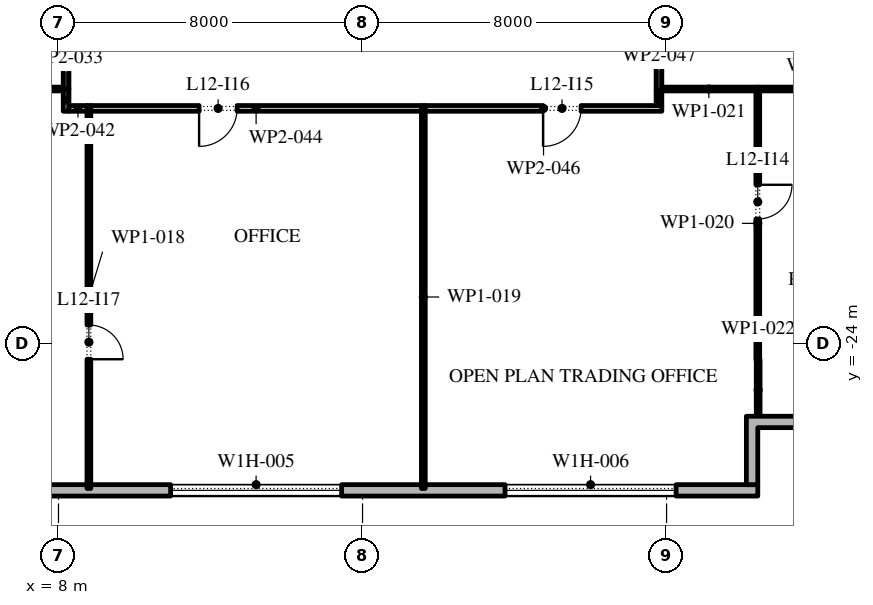
"""IFC4 building model, lengths in metres.
Left out: names, types, materials, properties, quantities, classifications, styles, units other than length and angle.
Written with IfcOpenShell. Run it as: python <this file> out.ifc"""

import sys

from ifc_helpers import new_model, si_unit, direction, frame, frame_2d, origin, place, context, subcontext, project, spatial, polyline, rectangle, outline, extrude, element, fill, save


model = new_model("IFC4")
c1 = context("Model", 3, precision=1e-05, world=origin(), true_north=direction((0.0, 1.0)))
c2 = subcontext(c1, "Body", "Model", "MODEL_VIEW")
j1 = project(units=[si_unit("LENGTHUNIT", "METRE"), si_unit("PLANEANGLEUNIT", "RADIAN")], contexts=[c1])
p1 = place(None, origin())
s1 = spatial("IfcSite", under=j1, at=p1, CompositionType="ELEMENT")
p2 = place(p1, origin())
s2 = spatial("IfcBuilding", under=s1, at=p2, CompositionType="ELEMENT")
p3 = place(p2, frame((0.0, 0.0, 60.6)))
s3 = spatial("IfcBuildingStorey", under=s2, at=p3, CompositionType="ELEMENT", Elevation=60.6)
p4 = place(p3, frame((-26.1, -27.85, 0.0), z_axis=(0.0, 0.0, 1.0), x_axis=(1.0, 0.0, 0.0)))
e1 = element("IfcWall", 1, at=p4, inside=s3, PredefinedType="STANDARD", context=c2, shape_type="SweptSolid", body=[
    extrude(rectangle(XDim=52.5, YDim=0.3, at=frame_2d((26.25, 0.0))), origin(), (0.0, 0.0, 1.0), 4.0),
])
p5 = place(p4, frame((2.0, 0.0, 0.45)))
e2 = element("IfcOpeningElement", 2, at=p5, cuts=e1, PredefinedType="OPENING", context=c2, shape_type="SweptSolid", body=[
    extrude(rectangle(XDim=4.5, YDim=2.75, at=frame_2d((2.25, 1.375))), frame((0.0, 0.16, 0.0), z_axis=(0.0, -1.0, 0.0), x_axis=(1.0, 0.0, 0.0)), (0.0, 0.0, 1.0), 0.32),
])
p6 = place(p4, frame((10.65, 0.0, 0.45)))
e3 = element("IfcOpeningElement", 3, at=p6, cuts=e1, PredefinedType="OPENING", context=c2, shape_type="SweptSolid", body=[
    extrude(rectangle(XDim=4.5, YDim=2.75, at=frame_2d((2.25, 1.375))), frame((0.0, 0.16, 0.0), z_axis=(0.0, -1.0, 0.0), x_axis=(1.0, 0.0, 0.0)), (0.0, 0.0, 1.0), 0.32),
])
p7 = place(p4, frame((20.5, 0.0, 0.0)))
e4 = element("IfcOpeningElement", 4, at=p7, cuts=e1, PredefinedType="OPENING", context=c2, shape_type="SweptSolid", body=[
    extrude(rectangle(XDim=2.4, YDim=3.5, at=frame_2d((1.2, 1.75))), frame((0.0, 0.16, 0.0), z_axis=(0.0, -1.0, 0.0), x_axis=(1.0, 0.0, 0.0)), (0.0, 0.0, 1.0), 0.32),
])
p8 = place(p4, frame((28.25, 0.0, 0.45)))
e5 = element("IfcOpeningElement", 5, at=p8, cuts=e1, PredefinedType="OPENING", context=c2, shape_type="SweptSolid", body=[
    extrude(rectangle(XDim=4.5, YDim=2.75, at=frame_2d((2.25, 1.375))), frame((0.0, 0.16, 0.0), z_axis=(0.0, -1.0, 0.0), x_axis=(1.0, 0.0, 0.0)), (0.0, 0.0, 1.0), 0.32),
])
p9 = place(p4, frame((37.05, 0.0, 0.45)))
e6 = element("IfcOpeningElement", 6, at=p9, cuts=e1, PredefinedType="OPENING", context=c2, shape_type="SweptSolid", body=[
    extrude(rectangle(XDim=4.5, YDim=2.75, at=frame_2d((2.25, 1.375))), frame((0.0, 0.16, 0.0), z_axis=(0.0, -1.0, 0.0), x_axis=(1.0, 0.0, 0.0)), (0.0, 0.0, 1.0), 0.32),
])
p10 = place(p4, frame((45.85, 0.0, 0.45)))
e7 = element("IfcOpeningElement", 7, at=p10, cuts=e1, PredefinedType="OPENING", context=c2, shape_type="SweptSolid", body=[
    extrude(rectangle(XDim=4.5, YDim=2.75, at=frame_2d((2.25, 1.375))), frame((0.0, 0.16, 0.0), z_axis=(0.0, -1.0, 0.0), x_axis=(1.0, 0.0, 0.0)), (0.0, 0.0, 1.0), 0.32),
])
p11 = place(p3, origin())
e8 = element("IfcWall", 8, at=p11, inside=s3, PredefinedType="STANDARD", context=c2, shape_type="SweptSolid", body=[
    extrude(outline(polyline([(27.9, -25.9), (27.9, -24.1), (30.0, -24.1), (30.0, -24.4), (28.2, -24.4), (28.2, -26.2), (26.4, -26.2), (26.4, -27.7), (26.1, -27.7), (26.1, -25.9), (27.9, -25.9)])), origin(), (0.0, 0.0, 1.0), 4.0),
])
p12 = place(p3, frame((8.2, -17.875, 0.0), z_axis=(0.0, 0.0, 1.0), x_axis=(0.0, 1.0, 0.0)))
e9 = element("IfcWall", 9, at=p12, inside=s3, PredefinedType="PARTITIONING", context=c2, shape_type="SweptSolid", body=[
    extrude(rectangle(XDim=0.585, YDim=0.15, at=frame_2d((0.292, 0.0))), origin(), (0.0, 0.0, 1.0), 4.0),
])
p13 = place(p3, frame((8.125, -17.29, 0.0), z_axis=(0.0, 0.0, 1.0), x_axis=(-1.0, 0.0, 0.0)))
e10 = element("IfcWall", 10, at=p13, inside=s3, PredefinedType="PARTITIONING", context=c2, shape_type="SweptSolid", body=[
    extrude(rectangle(XDim=8.075, YDim=0.1, at=frame_2d((4.038, 0.0))), origin(), (0.0, 0.0, 1.0), 4.0),
])
p14 = place(p3, frame((8.2, -17.29, 0.0), z_axis=(0.0, 0.0, 1.0), x_axis=(0.0, 1.0, 0.0)))
e11 = element("IfcWall", 11, at=p14, inside=s3, PredefinedType="PARTITIONING", context=c2, shape_type="SweptSolid", body=[
    extrude(rectangle(XDim=8.74, YDim=0.15, at=frame_2d((4.37, 0.0))), origin(), (0.0, 0.0, 1.0), 4.0),
])
p15 = place(p14, frame((3.89, 0.0, 0.0)))
e12 = element("IfcOpeningElement", 12, at=p15, cuts=e11, PredefinedType="OPENING", context=c2, shape_type="SweptSolid", body=[
    extrude(rectangle(XDim=1.0, YDim=2.1, at=frame_2d((0.5, 1.05))), frame((0.0, 0.085, 0.0), z_axis=(0.0, -1.0, 0.0), x_axis=(1.0, 0.0, 0.0)), (0.0, 0.0, 1.0), 0.17),
])
p16 = place(p3, frame((8.8, -27.8, 0.0), z_axis=(0.0, 0.0, 1.0), x_axis=(0.0, 1.0, 0.0)))
e13 = element("IfcWall", 13, at=p16, inside=s3, PredefinedType="PARTITIONING", context=c2, shape_type="SweptSolid", body=[
    extrude(rectangle(XDim=10.075, YDim=0.1, at=frame_2d((5.038, 0.0))), origin(), (0.0, 0.0, 1.0), 4.0),
])
p17 = place(p16, frame((3.4, 0.0, 0.0)))
e14 = element("IfcOpeningElement", 14, at=p17, cuts=e13, PredefinedType="OPENING", context=c2, shape_type="SweptSolid", body=[
    extrude(rectangle(XDim=0.9, YDim=2.1, at=frame_2d((0.45, 1.05))), frame((0.0, 0.06, 0.0), z_axis=(0.0, -1.0, 0.0), x_axis=(1.0, 0.0, 0.0)), (0.0, 0.0, 1.0), 0.12),
])
p18 = place(p3, frame((8.75, -17.8, 0.0), z_axis=(0.0, 0.0, 1.0), x_axis=(-1.0, 0.0, 0.0)))
e15 = element("IfcWall", 15, at=p18, inside=s3, PredefinedType="PARTITIONING", context=c2, shape_type="SweptSolid", body=[
    extrude(rectangle(XDim=0.475, YDim=0.15, at=frame_2d((0.238, 0.0))), origin(), (0.0, 0.0, 1.0), 4.0),
])
p19 = place(p3, frame((17.6, -27.8, 0.0), z_axis=(0.0, 0.0, 1.0), x_axis=(0.0, 1.0, 0.0)))
e16 = element("IfcWall", 16, at=p19, inside=s3, PredefinedType="PARTITIONING", context=c2, shape_type="SweptSolid", body=[
    extrude(rectangle(XDim=10.075, YDim=0.1, at=frame_2d((5.038, 0.0))), origin(), (0.0, 0.0, 1.0), 4.0),
])
p20 = place(p3, frame((17.55, -17.8, 0.0), z_axis=(0.0, 0.0, 1.0), x_axis=(-1.0, 0.0, 0.0)))
e17 = element("IfcWall", 17, at=p20, inside=s3, PredefinedType="PARTITIONING", context=c2, shape_type="SweptSolid", body=[
    extrude(rectangle(XDim=8.7, YDim=0.15, at=frame_2d((4.35, 0.0))), origin(), (0.0, 0.0, 1.0), 4.0),
])
p21 = place(p20, frame((4.85, 0.0, 0.0)))
e18 = element("IfcOpeningElement", 18, at=p21, cuts=e17, PredefinedType="OPENING", context=c2, shape_type="SweptSolid", body=[
    extrude(rectangle(XDim=1.0, YDim=2.1, at=frame_2d((0.5, 1.05))), frame((0.0, 0.085, 0.0), z_axis=(0.0, -1.0, 0.0), x_axis=(1.0, 0.0, 0.0)), (0.0, 0.0, 1.0), 0.17),
])
p22 = place(p3, frame((23.875, -17.8, 0.0), z_axis=(0.0, 0.0, 1.0), x_axis=(-1.0, 0.0, 0.0)))
e19 = element("IfcWall", 19, at=p22, inside=s3, PredefinedType="PARTITIONING", context=c2, shape_type="SweptSolid", body=[
    extrude(rectangle(XDim=6.225, YDim=0.15, at=frame_2d((3.113, 0.0))), origin(), (0.0, 0.0, 1.0), 4.0),
])
p23 = place(p22, frame((2.125, 0.0, 0.0)))
e20 = element("IfcOpeningElement", 20, at=p23, cuts=e19, PredefinedType="OPENING", context=c2, shape_type="SweptSolid", body=[
    extrude(rectangle(XDim=1.0, YDim=2.1, at=frame_2d((0.5, 1.05))), frame((0.0, 0.085, 0.0), z_axis=(0.0, -1.0, 0.0), x_axis=(1.0, 0.0, 0.0)), (0.0, 0.0, 1.0), 0.17),
])
p24 = place(p3, frame((23.8, -17.34, 0.0), z_axis=(0.0, 0.0, 1.0), x_axis=(0.0, -1.0, 0.0)))
e21 = element("IfcWall", 21, at=p24, inside=s3, PredefinedType="PARTITIONING", context=c2, shape_type="SweptSolid", body=[
    extrude(rectangle(XDim=0.385, YDim=0.15, at=frame_2d((0.192, 0.0))), origin(), (0.0, 0.0, 1.0), 4.0),
])
p25 = place(p3, frame((23.8, -10.22, 0.0), z_axis=(0.0, 0.0, 1.0), x_axis=(0.0, -1.0, 0.0)))
e22 = element("IfcWall", 22, at=p25, inside=s3, PredefinedType="PARTITIONING", context=c2, shape_type="SweptSolid", body=[
    extrude(rectangle(XDim=7.12, YDim=0.15, at=frame_2d((3.56, 0.0))), origin(), (0.0, 0.0, 1.0), 4.0),
])
p26 = place(p25, frame((4.42, 0.0, 0.0)))
e23 = element("IfcOpeningElement", 23, at=p26, cuts=e22, PredefinedType="OPENING", context=c2, shape_type="SweptSolid", body=[
    extrude(rectangle(XDim=1.0, YDim=2.1, at=frame_2d((0.5, 1.05))), frame((0.0, 0.085, 0.0), z_axis=(0.0, -1.0, 0.0), x_axis=(1.0, 0.0, 0.0)), (0.0, 0.0, 1.0), 0.17),
])
p27 = place(p3, frame((26.4, -24.41, 0.0), z_axis=(0.0, 0.0, 1.0), x_axis=(0.0, 1.0, 0.0)))
e24 = element("IfcWall", 24, at=p27, inside=s3, PredefinedType="PARTITIONING", context=c2, shape_type="SweptSolid", body=[
    extrude(rectangle(XDim=7.17, YDim=0.1, at=frame_2d((3.585, 0.0))), origin(), (0.0, 0.0, 1.0), 4.0),
])
p28 = place(p27, frame((3.7, 0.0, 0.0)))
e25 = element("IfcOpeningElement", 25, at=p28, cuts=e24, PredefinedType="OPENING", context=c2, shape_type="SweptSolid", body=[
    extrude(rectangle(XDim=0.9, YDim=2.1, at=frame_2d((0.45, 1.05))), frame((0.0, 0.06, 0.0), z_axis=(0.0, -1.0, 0.0), x_axis=(1.0, 0.0, 0.0)), (0.0, 0.0, 1.0), 0.12),
])
p29 = place(p3, frame((26.35, -17.29, 0.0), z_axis=(0.0, 0.0, 1.0), x_axis=(-1.0, 0.0, 0.0)))
e26 = element("IfcWall", 26, at=p29, inside=s3, PredefinedType="PARTITIONING", context=c2, shape_type="SweptSolid", body=[
    extrude(rectangle(XDim=2.475, YDim=0.1, at=frame_2d((1.238, 0.0))), origin(), (0.0, 0.0, 1.0), 4.0),
])
p30 = place(p3, frame((26.41, -26.0, 0.0), z_axis=(0.0, 0.0, 1.0), x_axis=(0.0, 1.0, 0.0)))
e27 = element("IfcWall", 27, at=p30, inside=s3, PredefinedType="PARTITIONING", context=c2, shape_type="SweptSolid", body=[
    extrude(rectangle(XDim=1.59, YDim=0.1, at=frame_2d((0.795, 0.0))), origin(), (0.0, 0.0, 1.0), 4.0),
])
p31 = place(p3, frame((29.8, -17.29, 0.0), z_axis=(0.0, 0.0, 1.0), x_axis=(-1.0, 0.0, 0.0)))
e28 = element("IfcWall", 28, at=p31, inside=s3, PredefinedType="PARTITIONING", context=c2, shape_type="SweptSolid", body=[
    extrude(rectangle(XDim=3.35, YDim=0.1, at=frame_2d((1.675, 0.0))), origin(), (0.0, 0.0, 1.0), 4.0),
])
p32 = place(p9, origin())
e29 = element("IfcWindow", 29, at=p32, inside=s3, PartitioningType="DOUBLE_PANEL_VERTICAL", PredefinedType="WINDOW", context=c2, shape_type="SweptSolid", body=[
    extrude(rectangle(XDim=4.5, YDim=2.75, at=frame_2d((2.25, 1.375))), frame((0.0, 0.03, 0.0), z_axis=(0.0, -1.0, 0.0), x_axis=(1.0, 0.0, 0.0)), (0.0, 0.0, 1.0), 0.06),
])
fill(e6, e29)
p33 = place(p10, origin())
e30 = element("IfcWindow", 30, at=p33, inside=s3, PartitioningType="DOUBLE_PANEL_VERTICAL", PredefinedType="WINDOW", context=c2, shape_type="SweptSolid", body=[
    extrude(rectangle(XDim=4.5, YDim=2.75, at=frame_2d((2.25, 1.375))), frame((0.0, 0.03, 0.0), z_axis=(0.0, -1.0, 0.0), x_axis=(1.0, 0.0, 0.0)), (0.0, 0.0, 1.0), 0.06),
])
fill(e7, e30)
p34 = place(p28, frame((0.9, 0.0, 0.0), z_axis=(0.0, 0.0, 1.0), x_axis=(-1.0, 0.0, 0.0)))
e31 = element("IfcDoor", 31, at=p34, inside=s3, OperationType="SINGLE_SWING_RIGHT", PredefinedType="DOOR", context=c2, shape_type="SweptSolid", body=[
    extrude(rectangle(XDim=0.9, YDim=2.1, at=frame_2d((0.45, 1.05))), frame((0.0, 0.025, 0.0), z_axis=(0.0, -1.0, 0.0), x_axis=(1.0, 0.0, 0.0)), (0.0, 0.0, 1.0), 0.05),
])
fill(e25, e31)
p35 = place(p23, origin())
e32 = element("IfcDoor", 32, at=p35, inside=s3, OperationType="SINGLE_SWING_LEFT", PredefinedType="DOOR", context=c2, shape_type="SweptSolid", body=[
    extrude(rectangle(XDim=1.0, YDim=2.1, at=frame_2d((0.5, 1.05))), frame((0.0, 0.025, 0.0), z_axis=(0.0, -1.0, 0.0), x_axis=(1.0, 0.0, 0.0)), (0.0, 0.0, 1.0), 0.05),
])
fill(e20, e32)
p36 = place(p21, origin())
e33 = element("IfcDoor", 33, at=p36, inside=s3, OperationType="SINGLE_SWING_LEFT", PredefinedType="DOOR", context=c2, shape_type="SweptSolid", body=[
    extrude(rectangle(XDim=1.0, YDim=2.1, at=frame_2d((0.5, 1.05))), frame((0.0, 0.025, 0.0), z_axis=(0.0, -1.0, 0.0), x_axis=(1.0, 0.0, 0.0)), (0.0, 0.0, 1.0), 0.05),
])
fill(e18, e33)
p37 = place(p17, frame((0.9, 0.0, 0.0), z_axis=(0.0, 0.0, 1.0), x_axis=(-1.0, 0.0, 0.0)))
e34 = element("IfcDoor", 34, at=p37, inside=s3, OperationType="SINGLE_SWING_LEFT", PredefinedType="DOOR", context=c2, shape_type="SweptSolid", body=[
    extrude(rectangle(XDim=0.9, YDim=2.1, at=frame_2d((0.45, 1.05))), frame((0.0, 0.025, 0.0), z_axis=(0.0, -1.0, 0.0), x_axis=(1.0, 0.0, 0.0)), (0.0, 0.0, 1.0), 0.05),
])
fill(e14, e34)
save(model, sys.argv[1])
